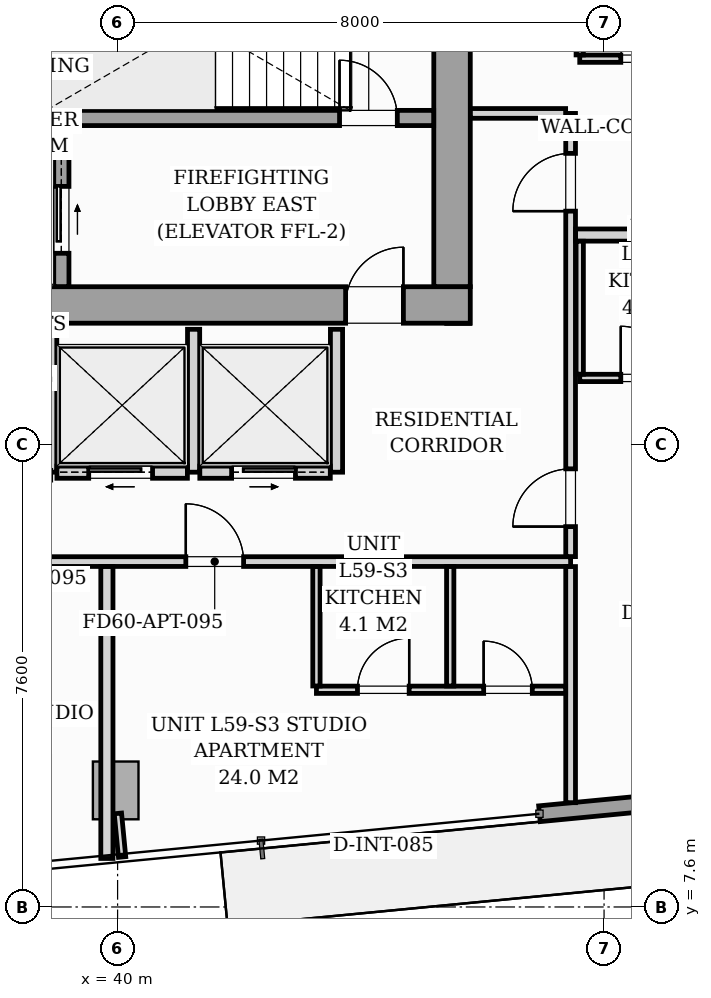
"""IFC4 building model, lengths in metres.
Left out: names, types, materials, properties, quantities, classifications, styles, units other than length and angle.
Written with IfcOpenShell. Run it as: python <this file> out.ifc"""

import sys

from ifc_helpers import new_model, si_unit, direction, frame, frame_2d, origin, origin_2d, place, context, subcontext, project, spatial, rectangle, i_section, extrude, source, transform, mapped, element, fill, save


model = new_model("IFC4")
c1 = context("Model", 3, precision=1e-05, world=origin(), true_north=direction((0.0, 1.0)))
c2 = subcontext(c1, "Body", "Model", "MODEL_VIEW")
j1 = project(units=[si_unit("LENGTHUNIT", "METRE"), si_unit("PLANEANGLEUNIT", "RADIAN")], contexts=[c1])
p1 = place(None, origin())
s1 = spatial("IfcSite", under=j1, at=p1, CompositionType="ELEMENT")
p2 = place(p1, origin())
s2 = spatial("IfcBuilding", under=s1, at=p2, CompositionType="ELEMENT")
p3 = place(p2, frame((0.0, 0.0, 205.0)))
s3 = spatial("IfcBuildingStorey", under=s2, at=p3, CompositionType="ELEMENT", Elevation=205.0)
m1 = source(origin(), c2, "Body", "SweptSolid", [
    extrude(i_section(OverallWidth=0.416, OverallDepth=0.446, WebThickness=0.039, FlangeThickness=0.063, FilletRadius=0.018, at=origin_2d()), origin(), (0.0, 0.0, 1.0), 3.196),
])
for number, where, z_axis, x_axis in (
    (1, (38.88, 17.4, 0.002), (0.0, 0.0, 1.0), (1.0, 0.0, 0.0)),
    (2, (45.6, 17.4, 0.002), (0.0, 0.0, 1.0), (1.0, 0.0, 0.0)),
):
    element("IfcColumn", number, at=place(p3, frame(where, z_axis=z_axis, x_axis=x_axis)), inside=s3, PredefinedType="PILASTER", context=c2, shape_type="MappedRepresentation", body=[
        mapped(m1, transform((0.0, 0.0, 0.0), scale=1.0)),
    ])
m2 = source(origin(), c2, "Body", "SweptSolid", [
    extrude(rectangle(XDim=0.75, YDim=0.95, at=origin_2d()), origin(), (0.0, 0.0, 1.0), 3.196),
])
p4 = place(p3, frame((39.969, 9.517, 0.002), z_axis=(0.0, 0.0, 1.0), x_axis=(0.995396198367, 0.09584575252, 0.0)))
e3 = element("IfcColumn", 3, at=p4, inside=s3, PredefinedType="COLUMN", context=c2, shape_type="MappedRepresentation", body=[
    mapped(m2, transform((0.0, 0.0, 0.0), scale=1.0)),
])
p5 = place(p3, frame((62.963, 10.676, 0.0), z_axis=(0.0, 0.0, 1.0), x_axis=(-0.995395627913, -0.095851676732, 0.0)))
e4 = element("IfcWall", 4, at=p5, inside=s3, PredefinedType="STANDARD", context=c2, shape_type="SweptSolid", body=[
    extrude(rectangle(XDim=16.1, YDim=0.26, at=frame_2d((8.05, 0.0))), origin(), (0.0, 0.0, 1.0), 2.94),
])
p6 = place(p5, frame((7.498, 0.0, 0.0)))
e5 = element("IfcOpeningElement", 5, at=p6, cuts=e4, PredefinedType="OPENING", context=c2, shape_type="SweptSolid", body=[
    extrude(rectangle(XDim=1.8, YDim=2.06, at=frame_2d((0.9, 1.03))), frame((0.0, 0.14, 0.0), z_axis=(0.0, -1.0, 0.0), x_axis=(1.0, 0.0, 0.0)), (0.0, 0.0, 1.0), 0.28),
])
p7 = place(p5, frame((2.05, 0.0, 0.65)))
e6 = element("IfcOpeningElement", 6, at=p7, cuts=e4, PredefinedType="OPENING", context=c2, shape_type="SweptSolid", body=[
    extrude(rectangle(XDim=1.6, YDim=1.5, at=frame_2d((0.8, 0.75))), frame((0.0, 0.14, 0.0), z_axis=(0.0, -1.0, 0.0), x_axis=(1.0, 0.0, 0.0)), (0.0, 0.0, 1.0), 0.28),
])
p8 = place(p3, frame((26.2, 17.5, 0.0), z_axis=(0.0, 0.0, 1.0), x_axis=(1.0, 0.0, 0.0)))
e7 = element("IfcWall", 7, at=p8, inside=s3, PredefinedType="SHEAR", context=c2, shape_type="SweptSolid", body=[
    extrude(rectangle(XDim=19.6, YDim=0.6, at=frame_2d((9.8, 0.0))), origin(), (0.0, 0.0, 1.0), 3.2),
])
p9 = place(p8, frame((0.95, 0.0, 0.0)))
e8 = element("IfcOpeningElement", 8, at=p9, cuts=e7, PredefinedType="OPENING", context=c2, shape_type="SweptSolid", body=[
    extrude(rectangle(XDim=0.95, YDim=2.06, at=frame_2d((0.475, 1.03))), frame((0.0, 0.31, 0.0), z_axis=(0.0, -1.0, 0.0), x_axis=(1.0, 0.0, 0.0)), (0.0, 0.0, 1.0), 0.62),
])
p10 = place(p8, frame((9.38, 0.0, 0.0)))
e9 = element("IfcOpeningElement", 9, at=p10, cuts=e7, PredefinedType="OPENING", context=c2, shape_type="SweptSolid", body=[
    extrude(rectangle(XDim=0.85, YDim=2.0, at=frame_2d((0.425, 1.0))), frame((0.0, 0.31, 0.0), z_axis=(0.0, -1.0, 0.0), x_axis=(1.0, 0.0, 0.0)), (0.0, 0.0, 1.0), 0.62),
])
p11 = place(p8, frame((17.55, 0.0, 0.0)))
e10 = element("IfcOpeningElement", 10, at=p11, cuts=e7, PredefinedType="OPENING", context=c2, shape_type="SweptSolid", body=[
    extrude(rectangle(XDim=0.95, YDim=2.06, at=frame_2d((0.475, 1.03))), frame((0.0, 0.31, 0.0), z_axis=(0.0, -1.0, 0.0), x_axis=(1.0, 0.0, 0.0)), (0.0, 0.0, 1.0), 0.62),
])
p12 = place(p3, frame((45.5, 17.802, 0.0), z_axis=(0.0, 0.0, 1.0), x_axis=(0.0, 1.0, 0.0)))
e11 = element("IfcWall", 11, at=p12, inside=s3, PredefinedType="SHEAR", context=c2, shape_type="SweptSolid", body=[
    extrude(rectangle(XDim=5.796, YDim=0.6, at=frame_2d((2.898, 0.0))), origin(), (0.0, 0.0, 1.0), 3.2),
])
p13 = place(p3, frame((37.05, 20.575, 0.0), z_axis=(0.0, 0.0, 1.0), x_axis=(1.0, 0.0, 0.0)))
e12 = element("IfcWall", 12, at=p13, inside=s3, PredefinedType="SOLIDWALL", context=c2, shape_type="SweptSolid", body=[
    extrude(rectangle(XDim=8.148, YDim=0.25, at=frame_2d((4.074, 0.0))), origin(), (0.0, 0.0, 1.0), 3.2),
])
p14 = place(p13, frame((6.6, 0.0, 0.0)))
e13 = element("IfcOpeningElement", 13, at=p14, cuts=e12, PredefinedType="OPENING", context=c2, shape_type="SweptSolid", body=[
    extrude(rectangle(XDim=0.95, YDim=2.06, at=frame_2d((0.475, 1.03))), frame((0.0, 0.135, 0.0), z_axis=(0.0, -1.0, 0.0), x_axis=(1.0, 0.0, 0.0)), (0.0, 0.0, 1.0), 0.27),
])
p15 = place(p3, frame((39.075, 17.802, 0.0), z_axis=(0.0, 0.0, 1.0), x_axis=(0.0, 1.0, 0.0)))
e14 = element("IfcWall", 14, at=p15, inside=s3, PredefinedType="SOLIDWALL", context=c2, shape_type="SweptSolid", body=[
    extrude(rectangle(XDim=2.646, YDim=0.25, at=frame_2d((1.323, 0.0))), origin(), (0.0, 0.0, 1.0), 3.2),
])
p16 = place(p15, frame((0.548, 0.0, 0.0)))
e15 = element("IfcOpeningElement", 15, at=p16, cuts=e14, PredefinedType="OPENING", context=c2, shape_type="SweptSolid", body=[
    extrude(rectangle(XDim=1.1, YDim=2.08, at=frame_2d((0.55, 1.04))), frame((0.0, 0.135, 0.0), z_axis=(0.0, -1.0, 0.0), x_axis=(1.0, 0.0, 0.0)), (0.0, 0.0, 1.0), 0.27),
])
for number, where, z_axis, x_axis in (
    (16, (38.9, 14.75, 0.0), (0.0, 0.0, 1.0), (0.0, 1.0, 0.0)),
    (17, (41.25, 14.75, 0.0), (0.0, 0.0, 1.0), (0.0, 1.0, 0.0)),
    (18, (43.6, 14.75, 0.0), (0.0, 0.0, 1.0), (0.0, 1.0, 0.0)),
):
    element("IfcWall", number, at=place(p3, frame(where, z_axis=z_axis, x_axis=x_axis)), inside=s3, PredefinedType="PARTITIONING", context=c2, shape_type="SweptSolid", body=[
        extrude(rectangle(XDim=2.35, YDim=0.2, at=frame_2d((1.175, 0.0))), origin(), (0.0, 0.0, 1.0), 2.94),
    ])
p17 = place(p3, frame((39.002, 14.75, 0.0), z_axis=(0.0, 0.0, 1.0), x_axis=(1.0, 0.0, 0.0)))
e19 = element("IfcWall", 19, at=p17, inside=s3, PredefinedType="PARTITIONING", context=c2, shape_type="SweptSolid", body=[
    extrude(rectangle(XDim=2.146, YDim=0.2, at=frame_2d((1.073, 0.0))), origin(), (0.0, 0.0, 1.0), 2.94),
])
p18 = place(p17, frame((0.523, 0.0, 0.0)))
e20 = element("IfcOpeningElement", 20, at=p18, cuts=e19, PredefinedType="OPENING", context=c2, shape_type="SweptSolid", body=[
    extrude(rectangle(XDim=1.05, YDim=2.08, at=frame_2d((0.525, 1.04))), frame((0.0, 0.11, 0.0), z_axis=(0.0, -1.0, 0.0), x_axis=(1.0, 0.0, 0.0)), (0.0, 0.0, 1.0), 0.22),
])
p19 = place(p3, frame((41.352, 14.75, 0.0), z_axis=(0.0, 0.0, 1.0), x_axis=(1.0, 0.0, 0.0)))
e21 = element("IfcWall", 21, at=p19, inside=s3, PredefinedType="PARTITIONING", context=c2, shape_type="SweptSolid", body=[
    extrude(rectangle(XDim=2.146, YDim=0.2, at=frame_2d((1.073, 0.0))), origin(), (0.0, 0.0, 1.0), 2.94),
])
p20 = place(p19, frame((0.523, 0.0, 0.0)))
e22 = element("IfcOpeningElement", 22, at=p20, cuts=e21, PredefinedType="OPENING", context=c2, shape_type="SweptSolid", body=[
    extrude(rectangle(XDim=1.05, YDim=2.08, at=frame_2d((0.525, 1.04))), frame((0.0, 0.11, 0.0), z_axis=(0.0, -1.0, 0.0), x_axis=(1.0, 0.0, 0.0)), (0.0, 0.0, 1.0), 0.22),
])
p21 = place(p3, frame((24.55, 13.28, 0.0), z_axis=(0.0, 0.0, 1.0), x_axis=(1.0, 0.0, 0.0)))
e23 = element("IfcWall", 23, at=p21, inside=s3, PredefinedType="PARTITIONING", context=c2, shape_type="SweptSolid", body=[
    extrude(rectangle(XDim=22.9, YDim=0.16, at=frame_2d((11.45, 0.0))), origin(), (0.0, 0.0, 1.0), 2.94),
])
p22 = place(p21, frame((5.378, 0.0, 0.0)))
e24 = element("IfcOpeningElement", 24, at=p22, cuts=e23, PredefinedType="OPENING", context=c2, shape_type="SweptSolid", body=[
    extrude(rectangle(XDim=0.95, YDim=2.06, at=frame_2d((0.475, 1.03))), frame((0.0, 0.09, 0.0), z_axis=(0.0, -1.0, 0.0), x_axis=(1.0, 0.0, 0.0)), (0.0, 0.0, 1.0), 0.18),
])
p23 = place(p21, frame((13.025, 0.0, 0.0)))
e25 = element("IfcOpeningElement", 25, at=p23, cuts=e23, PredefinedType="OPENING", context=c2, shape_type="SweptSolid", body=[
    extrude(rectangle(XDim=0.95, YDim=2.06, at=frame_2d((0.475, 1.03))), frame((0.0, 0.09, 0.0), z_axis=(0.0, -1.0, 0.0), x_axis=(1.0, 0.0, 0.0)), (0.0, 0.0, 1.0), 0.18),
])
p24 = place(p21, frame((16.572, 0.0, 0.0)))
e26 = element("IfcOpeningElement", 26, at=p24, cuts=e23, PredefinedType="OPENING", context=c2, shape_type="SweptSolid", body=[
    extrude(rectangle(XDim=0.95, YDim=2.06, at=frame_2d((0.475, 1.03))), frame((0.0, 0.09, 0.0), z_axis=(0.0, -1.0, 0.0), x_axis=(1.0, 0.0, 0.0)), (0.0, 0.0, 1.0), 0.18),
])
p25 = place(p3, frame((47.45, 9.315, 0.0), z_axis=(0.0, 0.0, 1.0), x_axis=(0.0, 1.0, 0.0)))
e27 = element("IfcWall", 27, at=p25, inside=s3, PredefinedType="PARTITIONING", context=c2, shape_type="SweptSolid", body=[
    extrude(rectangle(XDim=3.883, YDim=0.16, at=frame_2d((1.941, 0.0))), origin(), (0.0, 0.0, 1.0), 2.94),
])
p26 = place(p3, frame((47.45, 13.362, 0.0), z_axis=(0.0, 0.0, 1.0), x_axis=(0.0, 1.0, 0.0)))
e28 = element("IfcWall", 28, at=p26, inside=s3, PredefinedType="PARTITIONING", context=c2, shape_type="SweptSolid", body=[
    extrude(rectangle(XDim=7.288, YDim=0.16, at=frame_2d((3.644, 0.0))), origin(), (0.0, 0.0, 1.0), 2.94),
])
p27 = place(p26, frame((0.493, 0.0, 0.0)))
e29 = element("IfcOpeningElement", 29, at=p27, cuts=e28, PredefinedType="OPENING", context=c2, shape_type="SweptSolid", body=[
    extrude(rectangle(XDim=0.95, YDim=2.06, at=frame_2d((0.475, 1.03))), frame((0.0, 0.09, 0.0), z_axis=(0.0, -1.0, 0.0), x_axis=(1.0, 0.0, 0.0)), (0.0, 0.0, 1.0), 0.18),
])
p28 = place(p26, frame((5.681, 0.0, 0.0)))
e30 = element("IfcOpeningElement", 30, at=p28, cuts=e28, PredefinedType="OPENING", context=c2, shape_type="SweptSolid", body=[
    extrude(rectangle(XDim=0.95, YDim=2.06, at=frame_2d((0.475, 1.03))), frame((0.0, 0.09, 0.0), z_axis=(0.0, -1.0, 0.0), x_axis=(1.0, 0.0, 0.0)), (0.0, 0.0, 1.0), 0.18),
])
p29 = place(p3, frame((45.802, 20.65, 0.0), z_axis=(0.0, 0.0, 1.0), x_axis=(1.0, 0.0, 0.0)))
e31 = element("IfcWall", 31, at=p29, inside=s3, PredefinedType="PARTITIONING", context=c2, shape_type="SweptSolid", body=[
    extrude(rectangle(XDim=1.566, YDim=0.16, at=frame_2d((0.783, 0.0))), origin(), (0.0, 0.0, 1.0), 2.94),
])
p30 = place(p3, frame((39.824, 8.398, 0.0), z_axis=(0.0, 0.0, 1.0), x_axis=(0.0, 1.0, 0.0)))
e32 = element("IfcWall", 32, at=p30, inside=s3, PredefinedType="PARTITIONING", context=c2, shape_type="SweptSolid", body=[
    extrude(rectangle(XDim=4.8, YDim=0.2, at=frame_2d((2.4, 0.0))), origin(), (0.0, 0.0, 1.0), 2.94),
])
p31 = place(p3, frame((43.27, 11.172, 0.0), z_axis=(0.0, 0.0, 1.0), x_axis=(1.0, 0.0, 0.0)))
e33 = element("IfcWall", 33, at=p31, inside=s3, PredefinedType="PARTITIONING", context=c2, shape_type="SweptSolid", body=[
    extrude(rectangle(XDim=4.098, YDim=0.12, at=frame_2d((2.049, 0.0))), origin(), (0.0, 0.0, 1.0), 2.94),
])
p32 = place(p31, frame((0.675, 0.0, 0.0)))
e34 = element("IfcOpeningElement", 34, at=p32, cuts=e33, PredefinedType="OPENING", context=c2, shape_type="SweptSolid", body=[
    extrude(rectangle(XDim=0.85, YDim=2.05, at=frame_2d((0.425, 1.025))), frame((0.0, 0.07, 0.0), z_axis=(0.0, -1.0, 0.0), x_axis=(1.0, 0.0, 0.0)), (0.0, 0.0, 1.0), 0.14),
])
p33 = place(p31, frame((2.75, 0.0, 0.0)))
e35 = element("IfcOpeningElement", 35, at=p33, cuts=e33, PredefinedType="OPENING", context=c2, shape_type="SweptSolid", body=[
    extrude(rectangle(XDim=0.8, YDim=2.02, at=frame_2d((0.4, 1.01))), frame((0.0, 0.07, 0.0), z_axis=(0.0, -1.0, 0.0), x_axis=(1.0, 0.0, 0.0)), (0.0, 0.0, 1.0), 0.14),
])
for number, where, z_axis, x_axis in (
    (36, (43.27, 11.234, 0.0), (0.0, 0.0, 1.0), (0.0, 1.0, 0.0)),
    (37, (45.47, 11.234, 0.0), (0.0, 0.0, 1.0), (0.0, 1.0, 0.0)),
):
    element("IfcWall", number, at=place(p3, frame(where, z_axis=z_axis, x_axis=x_axis)), inside=s3, PredefinedType="PARTITIONING", context=c2, shape_type="SweptSolid", body=[
        extrude(rectangle(XDim=1.964, YDim=0.12, at=frame_2d((0.982, 0.0))), origin(), (0.0, 0.0, 1.0), 2.94),
    ])
p34 = place(p3, frame((47.532, 18.65, 0.0), z_axis=(0.0, 0.0, 1.0), x_axis=(1.0, 0.0, 0.0)))
e38 = element("IfcWall", 38, at=p34, inside=s3, PredefinedType="PARTITIONING", context=c2, shape_type="SweptSolid", body=[
    extrude(rectangle(XDim=17.095, YDim=0.2, at=frame_2d((8.547, 0.0))), origin(), (0.0, 0.0, 1.0), 2.281),
])
p35 = place(p3, frame((47.6, 16.3, 0.0), z_axis=(0.0, 0.0, 1.0), x_axis=(1.0, 0.0, 0.0)))
e39 = element("IfcWall", 39, at=p35, inside=s3, PredefinedType="PARTITIONING", context=c2, shape_type="SweptSolid", body=[
    extrude(rectangle(XDim=4.2, YDim=0.12, at=frame_2d((2.1, 0.0))), origin(), (0.0, 0.0, 1.0), 2.94),
])
p36 = place(p35, frame((0.675, 0.0, 0.0)))
e40 = element("IfcOpeningElement", 40, at=p36, cuts=e39, PredefinedType="OPENING", context=c2, shape_type="SweptSolid", body=[
    extrude(rectangle(XDim=0.85, YDim=2.05, at=frame_2d((0.425, 1.025))), frame((0.0, 0.07, 0.0), z_axis=(0.0, -1.0, 0.0), x_axis=(1.0, 0.0, 0.0)), (0.0, 0.0, 1.0), 0.14),
])
p37 = place(p35, frame((2.8, 0.0, 0.0)))
e41 = element("IfcOpeningElement", 41, at=p37, cuts=e39, PredefinedType="OPENING", context=c2, shape_type="SweptSolid", body=[
    extrude(rectangle(XDim=0.8, YDim=2.02, at=frame_2d((0.4, 1.01))), frame((0.0, 0.07, 0.0), z_axis=(0.0, -1.0, 0.0), x_axis=(1.0, 0.0, 0.0)), (0.0, 0.0, 1.0), 0.14),
])
p38 = place(p3, frame((47.6, 16.362, 0.0), z_axis=(0.0, 0.0, 1.0), x_axis=(0.0, 1.0, 0.0)))
e42 = element("IfcWall", 42, at=p38, inside=s3, PredefinedType="PARTITIONING", context=c2, shape_type="SweptSolid", body=[
    extrude(rectangle(XDim=2.186, YDim=0.12, at=frame_2d((1.093, 0.0))), origin(), (0.0, 0.0, 1.0), 2.94),
])
p39 = place(p3, frame((47.6, 21.55, 0.0), z_axis=(0.0, 0.0, 1.0), x_axis=(1.0, 0.0, 0.0)))
e43 = element("IfcWall", 43, at=p39, inside=s3, PredefinedType="PARTITIONING", context=c2, shape_type="SweptSolid", body=[
    extrude(rectangle(XDim=4.2, YDim=0.12, at=frame_2d((2.1, 0.0))), origin(), (0.0, 0.0, 1.0), 2.94),
])
p40 = place(p39, frame((0.675, 0.0, 0.0)))
e44 = element("IfcOpeningElement", 44, at=p40, cuts=e43, PredefinedType="OPENING", context=c2, shape_type="SweptSolid", body=[
    extrude(rectangle(XDim=0.85, YDim=2.05, at=frame_2d((0.425, 1.025))), frame((0.0, 0.07, 0.0), z_axis=(0.0, -1.0, 0.0), x_axis=(1.0, 0.0, 0.0)), (0.0, 0.0, 1.0), 0.14),
])
p41 = place(p39, frame((2.8, 0.0, 0.0)))
e45 = element("IfcOpeningElement", 45, at=p41, cuts=e43, PredefinedType="OPENING", context=c2, shape_type="SweptSolid", body=[
    extrude(rectangle(XDim=0.8, YDim=2.02, at=frame_2d((0.4, 1.01))), frame((0.0, 0.07, 0.0), z_axis=(0.0, -1.0, 0.0), x_axis=(1.0, 0.0, 0.0)), (0.0, 0.0, 1.0), 0.14),
])
p42 = place(p3, frame((47.6, 21.612, 0.0), z_axis=(0.0, 0.0, 1.0), x_axis=(0.0, 1.0, 0.0)))
e46 = element("IfcWall", 46, at=p42, inside=s3, PredefinedType="PARTITIONING", context=c2, shape_type="SweptSolid", body=[
    extrude(rectangle(XDim=2.126, YDim=0.12, at=frame_2d((1.063, 0.0))), origin(), (0.0, 0.0, 1.0), 2.94),
])
p43 = place(p3, frame((40.005, 9.139, 0.0), z_axis=(0.0, 0.0, 1.0), x_axis=(0.095977354523, -0.995383517755, 0.0)))
e47 = element("IfcWall", 47, at=p43, inside=s3, PredefinedType="PARTITIONING", context=c2, shape_type="SweptSolid", body=[
    extrude(rectangle(XDim=0.72, YDim=0.12, at=frame_2d((0.36, 0.0))), origin(), (0.0, 0.0, 1.0), 2.94),
])
m3 = source(origin(), c2, "Body", "SweptSolid", [
    extrude(rectangle(XDim=0.95, YDim=2.06, at=frame_2d((0.475, 1.03))), frame((0.0, 0.025, 0.0), z_axis=(0.0, -1.0, 0.0), x_axis=(1.0, 0.0, 0.0)), (0.0, 0.0, 1.0), 0.05),
])
p44 = place(p11, origin())
e48 = element("IfcDoor", 48, at=p44, inside=s3, OperationType="SINGLE_SWING_RIGHT", PredefinedType="DOOR", context=c2, shape_type="MappedRepresentation", body=[
    mapped(m3, transform((0.0, 0.0, 0.0), scale=1.0)),
])
fill(e10, e48)
p45 = place(p14, origin())
e49 = element("IfcDoor", 49, at=p45, inside=s3, OperationType="SINGLE_SWING_LEFT", PredefinedType="DOOR", context=c2, shape_type="MappedRepresentation", body=[
    mapped(m3, transform((0.0, 0.0, 0.0), scale=1.0)),
])
fill(e13, e49)
m4 = source(origin(), c2, "Body", "SweptSolid", [
    extrude(rectangle(XDim=1.1, YDim=2.08, at=frame_2d((0.55, 1.04))), frame((0.0, 0.025, 0.0), z_axis=(0.0, -1.0, 0.0), x_axis=(1.0, 0.0, 0.0)), (0.0, 0.0, 1.0), 0.05),
])
p46 = place(p16, origin())
e50 = element("IfcDoor", 50, at=p46, inside=s3, OperationType="SLIDING_TO_RIGHT", PredefinedType="DOOR", context=c2, shape_type="MappedRepresentation", body=[
    mapped(m4, transform((0.0, 0.0, 0.0), scale=1.0)),
])
fill(e15, e50)
m5 = source(origin(), c2, "Body", "SweptSolid", [
    extrude(rectangle(XDim=1.05, YDim=2.08, at=frame_2d((0.525, 1.04))), frame((0.0, 0.025, 0.0), z_axis=(0.0, -1.0, 0.0), x_axis=(1.0, 0.0, 0.0)), (0.0, 0.0, 1.0), 0.05),
])
p47 = place(p18, origin())
e51 = element("IfcDoor", 51, at=p47, inside=s3, OperationType="SLIDING_TO_LEFT", PredefinedType="DOOR", context=c2, shape_type="MappedRepresentation", body=[
    mapped(m5, transform((0.0, 0.0, 0.0), scale=1.0)),
])
fill(e20, e51)
p48 = place(p20, origin())
e52 = element("IfcDoor", 52, at=p48, inside=s3, OperationType="SLIDING_TO_RIGHT", PredefinedType="DOOR", context=c2, shape_type="MappedRepresentation", body=[
    mapped(m5, transform((0.0, 0.0, 0.0), scale=1.0)),
])
fill(e22, e52)
m6 = source(origin(), c2, "Body", "SweptSolid", [
    extrude(rectangle(XDim=0.95, YDim=2.06, at=frame_2d((0.475, 1.03))), frame((0.0, 0.025, 0.0), z_axis=(0.0, -1.0, 0.0), x_axis=(1.0, 0.0, 0.0)), (0.0, 0.0, 1.0), 0.05),
])
p49 = place(p24, origin())
e53 = element("IfcDoor", 53, at=p49, inside=s3, OperationType="SINGLE_SWING_LEFT", PredefinedType="DOOR", context=c2, shape_type="MappedRepresentation", body=[
    mapped(m6, transform((0.0, 0.0, 0.0), scale=1.0)),
])
fill(e26, e53)
m7 = source(origin(), c2, "Body", "SweptSolid", [
    extrude(rectangle(XDim=0.85, YDim=2.05, at=frame_2d((0.425, 1.025))), frame((0.0, 0.025, 0.0), z_axis=(0.0, -1.0, 0.0), x_axis=(1.0, 0.0, 0.0)), (0.0, 0.0, 1.0), 0.05),
])
p50 = place(p32, origin())
e54 = element("IfcDoor", 54, at=p50, inside=s3, OperationType="SINGLE_SWING_RIGHT", PredefinedType="DOOR", context=c2, shape_type="MappedRepresentation", body=[
    mapped(m7, transform((0.0, 0.0, 0.0), scale=1.0)),
])
fill(e34, e54)
m8 = source(origin(), c2, "Body", "SweptSolid", [
    extrude(rectangle(XDim=0.8, YDim=2.02, at=frame_2d((0.4, 1.01))), frame((0.0, 0.025, 0.0), z_axis=(0.0, -1.0, 0.0), x_axis=(1.0, 0.0, 0.0)), (0.0, 0.0, 1.0), 0.05),
])
p51 = place(p33, origin())
e55 = element("IfcDoor", 55, at=p51, inside=s3, OperationType="SINGLE_SWING_LEFT", PredefinedType="DOOR", context=c2, shape_type="MappedRepresentation", body=[
    mapped(m8, transform((0.0, 0.0, 0.0), scale=1.0)),
])
fill(e35, e55)
p52 = place(p27, origin())
e56 = element("IfcDoor", 56, at=p52, inside=s3, OperationType="SINGLE_SWING_LEFT", PredefinedType="DOOR", context=c2, shape_type="MappedRepresentation", body=[
    mapped(m6, transform((0.0, 0.0, 0.0), scale=1.0)),
])
fill(e29, e56)
p53 = place(p36, origin())
e57 = element("IfcDoor", 57, at=p53, inside=s3, OperationType="SINGLE_SWING_LEFT", PredefinedType="DOOR", context=c2, shape_type="MappedRepresentation", body=[
    mapped(m7, transform((0.0, 0.0, 0.0), scale=1.0)),
])
fill(e40, e57)
p54 = place(p28, origin())
e58 = element("IfcDoor", 58, at=p54, inside=s3, OperationType="SINGLE_SWING_LEFT", PredefinedType="DOOR", context=c2, shape_type="MappedRepresentation", body=[
    mapped(m6, transform((0.0, 0.0, 0.0), scale=1.0)),
])
fill(e30, e58)
p55 = place(p40, origin())
e59 = element("IfcDoor", 59, at=p55, inside=s3, OperationType="SINGLE_SWING_RIGHT", PredefinedType="DOOR", context=c2, shape_type="MappedRepresentation", body=[
    mapped(m7, transform((0.0, 0.0, 0.0), scale=1.0)),
])
fill(e44, e59)
save(model, sys.argv[1])
